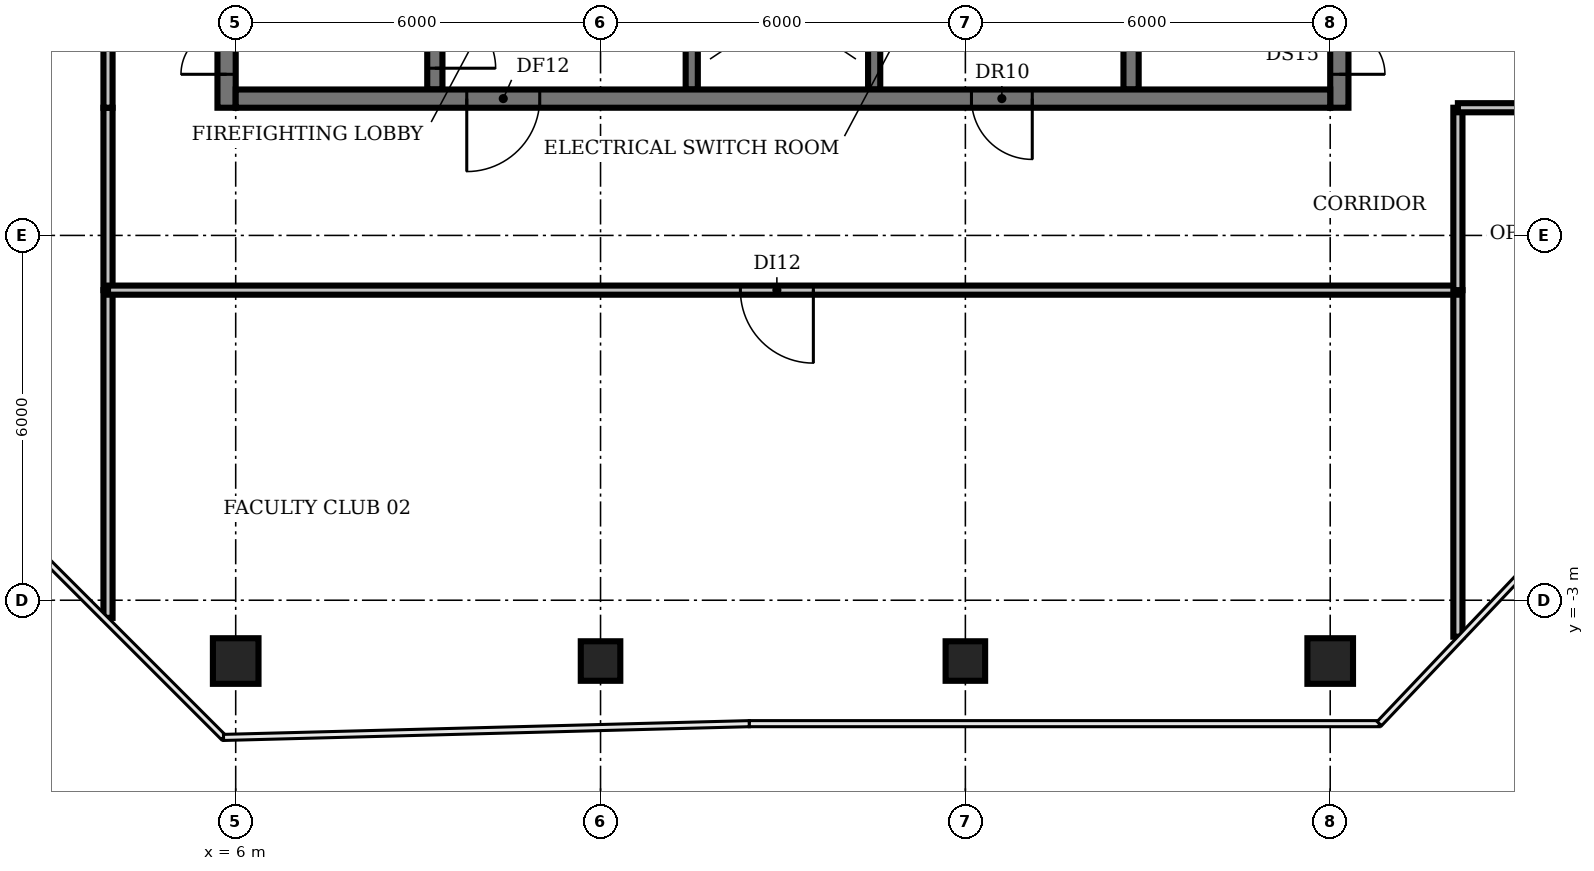
"""IFC4 building model, lengths in metres.
Left out: names, types, materials, properties, quantities, classifications, styles, units other than length and angle.
Written with IfcOpenShell. Run it as: python <this file> out.ifc"""

import sys

from ifc_helpers import new_model, si_unit, direction, frame, frame_2d, origin, origin_2d, place, context, subcontext, project, spatial, rectangle, circle, extrude, element, fill, save


model = new_model("IFC4")
c1 = context("Model", 3, precision=1e-05, world=origin(), true_north=direction((0.0, 1.0)))
c2 = subcontext(c1, "Body", "Model", "MODEL_VIEW")
j1 = project(units=[si_unit("LENGTHUNIT", "METRE"), si_unit("PLANEANGLEUNIT", "RADIAN")], contexts=[c1])
p1 = place(None, origin())
s1 = spatial("IfcSite", under=j1, at=p1, CompositionType="ELEMENT")
p2 = place(p1, origin())
s2 = spatial("IfcBuilding", under=s1, at=p2, CompositionType="ELEMENT")
p3 = place(p2, frame((0.0, 0.0, 327.2)))
s3 = spatial("IfcBuildingStorey", under=s2, at=p3, CompositionType="ELEMENT", Elevation=327.2)
p4 = place(p3, frame((6.0, -4.0, 0.0), z_axis=(0.0, 0.0, 1.0), x_axis=(1.0, 0.0, 0.0)))
e1 = element("IfcColumn", 1, at=p4, inside=s3, PredefinedType="COLUMN", context=c2, shape_type="SweptSolid", body=[
    extrude(circle(Radius=0.375, at=origin_2d()), origin(), (0.0, 0.0, 1.0), 3.9),
])
for number, where, z_axis, x_axis in (
    (2, (12.0, -4.0, 0.0), (0.0, 0.0, 1.0), (1.0, 0.0, 0.0)),
    (3, (18.0, -4.0, 0.0), (0.0, 0.0, 1.0), (1.0, 0.0, 0.0)),
):
    element("IfcColumn", number, at=place(p3, frame(where, z_axis=z_axis, x_axis=x_axis)), inside=s3, PredefinedType="COLUMN", context=c2, shape_type="SweptSolid", body=[
        extrude(rectangle(XDim=0.65, YDim=0.65, at=origin_2d()), origin(), (0.0, 0.0, 1.0), 3.9),
    ])
p5 = place(p3, frame((24.0, -4.0, 0.0), z_axis=(0.0, 0.0, 1.0), x_axis=(1.0, 0.0, 0.0)))
e4 = element("IfcColumn", 4, at=p5, inside=s3, PredefinedType="COLUMN", context=c2, shape_type="SweptSolid", body=[
    extrude(circle(Radius=0.375, at=origin_2d()), origin(), (0.0, 0.0, 1.0), 3.9),
])
p6 = place(p3, frame((9.275, 11.825, 0.0), z_axis=(0.0, 0.0, 1.0), x_axis=(0.0, -1.0, 0.0)))
e5 = element("IfcWall", 5, at=p6, inside=s3, PredefinedType="SHEAR", context=c2, shape_type="SweptSolid", body=[
    extrude(rectangle(XDim=6.425, YDim=0.25, at=frame_2d((3.212, 0.0))), origin(), (0.0, 0.0, 1.0), 3.9),
])
p7 = place(p6, frame((5.075, 0.0, 0.0)))
e6 = element("IfcOpeningElement", 6, at=p7, cuts=e5, PredefinedType="OPENING", context=c2, shape_type="SweptSolid", body=[
    extrude(rectangle(XDim=1.0, YDim=2.1, at=frame_2d((0.5, 1.05))), frame((0.0, 0.135, 0.0), z_axis=(0.0, -1.0, 0.0), x_axis=(1.0, 0.0, 0.0)), (0.0, 0.0, 1.0), 0.27),
])
p8 = place(p3, frame((13.5, 5.4, 0.0), z_axis=(0.0, 0.0, 1.0), x_axis=(0.0, 1.0, 0.0)))
e7 = element("IfcWall", 7, at=p8, inside=s3, PredefinedType="SHEAR", context=c2, shape_type="SweptSolid", body=[
    extrude(rectangle(XDim=8.2, YDim=0.2, at=frame_2d((4.1, 0.0))), origin(), (0.0, 0.0, 1.0), 3.9),
])
p9 = place(p8, frame((0.75, 0.0, 0.0)))
e8 = element("IfcOpeningElement", 8, at=p9, cuts=e7, PredefinedType="OPENING", context=c2, shape_type="SweptSolid", body=[
    extrude(rectangle(XDim=1.1, YDim=2.1, at=frame_2d((0.55, 1.05))), frame((0.0, 0.11, 0.0), z_axis=(0.0, -1.0, 0.0), x_axis=(1.0, 0.0, 0.0)), (0.0, 0.0, 1.0), 0.22),
])
p10 = place(p8, frame((3.55, 0.0, 0.0)))
e9 = element("IfcOpeningElement", 9, at=p10, cuts=e7, PredefinedType="OPENING", context=c2, shape_type="SweptSolid", body=[
    extrude(rectangle(XDim=1.1, YDim=2.1, at=frame_2d((0.55, 1.05))), frame((0.0, 0.11, 0.0), z_axis=(0.0, -1.0, 0.0), x_axis=(1.0, 0.0, 0.0)), (0.0, 0.0, 1.0), 0.22),
])
p11 = place(p8, frame((6.35, 0.0, 0.0)))
e10 = element("IfcOpeningElement", 10, at=p11, cuts=e7, PredefinedType="OPENING", context=c2, shape_type="SweptSolid", body=[
    extrude(rectangle(XDim=1.1, YDim=2.1, at=frame_2d((0.55, 1.05))), frame((0.0, 0.11, 0.0), z_axis=(0.0, -1.0, 0.0), x_axis=(1.0, 0.0, 0.0)), (0.0, 0.0, 1.0), 0.22),
])
p12 = place(p3, frame((16.5, 5.4, 0.0), z_axis=(0.0, 0.0, 1.0), x_axis=(0.0, 1.0, 0.0)))
e11 = element("IfcWall", 11, at=p12, inside=s3, PredefinedType="SHEAR", context=c2, shape_type="SweptSolid", body=[
    extrude(rectangle(XDim=8.2, YDim=0.2, at=frame_2d((4.1, 0.0))), origin(), (0.0, 0.0, 1.0), 3.9),
])
p13 = place(p3, frame((20.725, 5.4, 0.0), z_axis=(0.0, 0.0, 1.0), x_axis=(0.0, 1.0, 0.0)))
e12 = element("IfcWall", 12, at=p13, inside=s3, PredefinedType="SHEAR", context=c2, shape_type="SweptSolid", body=[
    extrude(rectangle(XDim=6.3, YDim=0.25, at=frame_2d((3.15, 0.0))), origin(), (0.0, 0.0, 1.0), 3.9),
])
p14 = place(p3, frame((5.85, 5.1, 0.0), z_axis=(0.0, 0.0, 1.0), x_axis=(0.0, 1.0, 0.0)))
e13 = element("IfcWall", 13, at=p14, inside=s3, PredefinedType="SHEAR", context=c2, shape_type="SweptSolid", body=[
    extrude(rectangle(XDim=20.0, YDim=0.3, at=frame_2d((10.0, 0.0))), origin(), (0.0, 0.0, 1.0), 3.9),
])
p15 = place(p14, frame((0.55, 0.0, 0.0)))
e14 = element("IfcOpeningElement", 14, at=p15, cuts=e13, PredefinedType="OPENING", context=c2, shape_type="SweptSolid", body=[
    extrude(rectangle(XDim=1.5, YDim=2.1, at=frame_2d((0.75, 1.05))), frame((0.0, 0.16, 0.0), z_axis=(0.0, -1.0, 0.0), x_axis=(1.0, 0.0, 0.0)), (0.0, 0.0, 1.0), 0.32),
])
p16 = place(p14, frame((7.0, 0.0, 0.0)))
e15 = element("IfcOpeningElement", 15, at=p16, cuts=e13, PredefinedType="OPENING", context=c2, shape_type="SweptSolid", body=[
    extrude(rectangle(XDim=1.2, YDim=2.1, at=frame_2d((0.6, 1.05))), frame((0.0, 0.16, 0.0), z_axis=(0.0, -1.0, 0.0), x_axis=(1.0, 0.0, 0.0)), (0.0, 0.0, 1.0), 0.32),
])
p17 = place(p14, frame((13.55, 0.0, 0.0)))
e16 = element("IfcOpeningElement", 16, at=p17, cuts=e13, PredefinedType="OPENING", context=c2, shape_type="SweptSolid", body=[
    extrude(rectangle(XDim=1.2, YDim=2.1, at=frame_2d((0.6, 1.05))), frame((0.0, 0.16, 0.0), z_axis=(0.0, -1.0, 0.0), x_axis=(1.0, 0.0, 0.0)), (0.0, 0.0, 1.0), 0.32),
])
p18 = place(p3, frame((24.15, 25.705, 0.0), z_axis=(0.0, 0.0, 1.0), x_axis=(0.0, -1.0, 0.0)))
e17 = element("IfcWall", 17, at=p18, inside=s3, PredefinedType="SHEAR", context=c2, shape_type="SweptSolid", body=[
    extrude(rectangle(XDim=20.605, YDim=0.3, at=frame_2d((10.302, 0.0))), origin(), (0.0, 0.0, 1.0), 3.9),
])
p19 = place(p18, frame((18.555, 0.0, 0.0)))
e18 = element("IfcOpeningElement", 18, at=p19, cuts=e17, PredefinedType="OPENING", context=c2, shape_type="SweptSolid", body=[
    extrude(rectangle(XDim=1.5, YDim=2.1, at=frame_2d((0.75, 1.05))), frame((0.0, 0.16, 0.0), z_axis=(0.0, -1.0, 0.0), x_axis=(1.0, 0.0, 0.0)), (0.0, 0.0, 1.0), 0.32),
])
p20 = place(p18, frame((12.455, 0.0, 0.0)))
e19 = element("IfcOpeningElement", 19, at=p20, cuts=e17, PredefinedType="OPENING", context=c2, shape_type="SweptSolid", body=[
    extrude(rectangle(XDim=0.9, YDim=2.1, at=frame_2d((0.45, 1.05))), frame((0.0, 0.16, 0.0), z_axis=(0.0, -1.0, 0.0), x_axis=(1.0, 0.0, 0.0)), (0.0, 0.0, 1.0), 0.32),
])
p21 = place(p18, frame((6.455, 0.0, 0.0)))
e20 = element("IfcOpeningElement", 20, at=p21, cuts=e17, PredefinedType="OPENING", context=c2, shape_type="SweptSolid", body=[
    extrude(rectangle(XDim=2.0, YDim=2.1, at=frame_2d((1.0, 1.05))), frame((0.0, 0.16, 0.0), z_axis=(0.0, -1.0, 0.0), x_axis=(1.0, 0.0, 0.0)), (0.0, 0.0, 1.0), 0.32),
])
p22 = place(p3, frame((24.0, 5.25, 0.0), z_axis=(0.0, 0.0, 1.0), x_axis=(-1.0, 0.0, 0.0)))
e21 = element("IfcWall", 21, at=p22, inside=s3, PredefinedType="SHEAR", context=c2, shape_type="SweptSolid", body=[
    extrude(rectangle(XDim=18.0, YDim=0.3, at=frame_2d((9.0, 0.0))), origin(), (0.0, 0.0, 1.0), 3.9),
])
p23 = place(p22, frame((13.0, 0.0, 0.0)))
e22 = element("IfcOpeningElement", 22, at=p23, cuts=e21, PredefinedType="OPENING", context=c2, shape_type="SweptSolid", body=[
    extrude(rectangle(XDim=1.2, YDim=2.1, at=frame_2d((0.6, 1.05))), frame((0.0, 0.16, 0.0), z_axis=(0.0, -1.0, 0.0), x_axis=(1.0, 0.0, 0.0)), (0.0, 0.0, 1.0), 0.32),
])
p24 = place(p22, frame((4.9, 0.0, 0.0)))
e23 = element("IfcOpeningElement", 23, at=p24, cuts=e21, PredefinedType="OPENING", context=c2, shape_type="SweptSolid", body=[
    extrude(rectangle(XDim=1.0, YDim=2.1, at=frame_2d((0.5, 1.05))), frame((0.0, 0.16, 0.0), z_axis=(0.0, -1.0, 0.0), x_axis=(1.0, 0.0, 0.0)), (0.0, 0.0, 1.0), 0.32),
])
p25 = place(p3, frame((3.9, -3.29, 0.0), z_axis=(0.0, 0.0, 1.0), x_axis=(0.0, 1.0, 0.0)))
e24 = element("IfcWall", 24, at=p25, inside=s3, PredefinedType="PARTITIONING", context=c2, shape_type="SweptSolid", body=[
    extrude(rectangle(XDim=5.39, YDim=0.15, at=frame_2d((2.695, 0.0))), origin(), (0.0, 0.0, 1.0), 2.95),
])
p26 = place(p3, frame((3.9, 2.1, 0.0), z_axis=(0.0, 0.0, 1.0), x_axis=(0.0, 1.0, 0.0)))
e25 = element("IfcWall", 25, at=p26, inside=s3, PredefinedType="PARTITIONING", context=c2, shape_type="SweptSolid", body=[
    extrude(rectangle(XDim=3.0, YDim=0.15, at=frame_2d((1.5, 0.0))), origin(), (0.0, 0.0, 1.0), 2.95),
])
p27 = place(p3, frame((3.9, 5.1, 0.0), z_axis=(0.0, 0.0, 1.0), x_axis=(0.0, 1.0, 0.0)))
e26 = element("IfcWall", 26, at=p27, inside=s3, PredefinedType="PARTITIONING", context=c2, shape_type="SweptSolid", body=[
    extrude(rectangle(XDim=13.9, YDim=0.15, at=frame_2d((6.95, 0.0))), origin(), (0.0, 0.0, 1.0), 2.95),
])
p28 = place(p27, frame((6.2, 0.0, 0.0)))
e27 = element("IfcOpeningElement", 27, at=p28, cuts=e26, PredefinedType="OPENING", context=c2, shape_type="SweptSolid", body=[
    extrude(rectangle(XDim=1.2, YDim=2.1, at=frame_2d((0.6, 1.05))), frame((0.0, 0.085, 0.0), z_axis=(0.0, -1.0, 0.0), x_axis=(1.0, 0.0, 0.0)), (0.0, 0.0, 1.0), 0.17),
])
p29 = place(p3, frame((26.1, -3.6, 0.0), z_axis=(0.0, 0.0, 1.0), x_axis=(0.0, 1.0, 0.0)))
e28 = element("IfcWall", 28, at=p29, inside=s3, PredefinedType="PARTITIONING", context=c2, shape_type="SweptSolid", body=[
    extrude(rectangle(XDim=5.7, YDim=0.15, at=frame_2d((2.85, 0.0))), origin(), (0.0, 0.0, 1.0), 2.95),
])
p30 = place(p3, frame((26.1, 2.1, 0.0), z_axis=(0.0, 0.0, 1.0), x_axis=(-1.0, 0.0, 0.0)))
e29 = element("IfcWall", 29, at=p30, inside=s3, PredefinedType="PARTITIONING", context=c2, shape_type="SweptSolid", body=[
    extrude(rectangle(XDim=22.2, YDim=0.15, at=frame_2d((11.1, 0.0))), origin(), (0.0, 0.0, 1.0), 2.95),
])
p31 = place(p30, frame((10.6, 0.0, 0.0)))
e30 = element("IfcOpeningElement", 30, at=p31, cuts=e29, PredefinedType="OPENING", context=c2, shape_type="SweptSolid", body=[
    extrude(rectangle(XDim=1.2, YDim=2.1, at=frame_2d((0.6, 1.05))), frame((0.0, 0.085, 0.0), z_axis=(0.0, -1.0, 0.0), x_axis=(1.0, 0.0, 0.0)), (0.0, 0.0, 1.0), 0.17),
])
p32 = place(p3, frame((26.1, 2.1, 0.0), z_axis=(0.0, 0.0, 1.0), x_axis=(0.0, 1.0, 0.0)))
e31 = element("IfcWall", 31, at=p32, inside=s3, PredefinedType="PARTITIONING", context=c2, shape_type="SweptSolid", body=[
    extrude(rectangle(XDim=3.0, YDim=0.15, at=frame_2d((1.5, 0.0))), origin(), (0.0, 0.0, 1.0), 2.95),
])
p33 = place(p3, frame((31.37, 5.1, 0.0), z_axis=(0.0, 0.0, 1.0), x_axis=(-1.0, 0.0, 0.0)))
e32 = element("IfcWall", 32, at=p33, inside=s3, PredefinedType="PARTITIONING", context=c2, shape_type="SweptSolid", body=[
    extrude(rectangle(XDim=5.27, YDim=0.15, at=frame_2d((2.635, 0.0))), origin(), (0.0, 0.0, 1.0), 2.95),
])
p34 = place(p33, frame((2.07, 0.0, 0.0)))
e33 = element("IfcOpeningElement", 33, at=p34, cuts=e32, PredefinedType="OPENING", context=c2, shape_type="SweptSolid", body=[
    extrude(rectangle(XDim=1.2, YDim=2.1, at=frame_2d((0.6, 1.05))), frame((0.0, 0.085, 0.0), z_axis=(0.0, -1.0, 0.0), x_axis=(1.0, 0.0, 0.0)), (0.0, 0.0, 1.0), 0.17),
])
p35 = place(p7, origin())
e34 = element("IfcDoor", 34, at=p35, inside=s3, OperationType="SINGLE_SWING_RIGHT", PredefinedType="DOOR", context=c2, shape_type="SweptSolid", body=[
    extrude(rectangle(XDim=1.0, YDim=2.1, at=frame_2d((0.5, 1.05))), frame((0.0, 0.025, 0.0), z_axis=(0.0, -1.0, 0.0), x_axis=(1.0, 0.0, 0.0)), (0.0, 0.0, 1.0), 0.05),
])
fill(e6, e34)
p36 = place(p15, origin())
e35 = element("IfcDoor", 35, at=p36, inside=s3, OperationType="DOUBLE_DOOR_SINGLE_SWING", PredefinedType="DOOR", context=c2, shape_type="SweptSolid", body=[
    extrude(rectangle(XDim=1.5, YDim=2.1, at=frame_2d((0.75, 1.05))), frame((0.0, 0.025, 0.0), z_axis=(0.0, -1.0, 0.0), x_axis=(1.0, 0.0, 0.0)), (0.0, 0.0, 1.0), 0.05),
])
fill(e14, e35)
p37 = place(p19, origin())
e36 = element("IfcDoor", 36, at=p37, inside=s3, OperationType="DOUBLE_DOOR_SINGLE_SWING", PredefinedType="DOOR", context=c2, shape_type="SweptSolid", body=[
    extrude(rectangle(XDim=1.5, YDim=2.1, at=frame_2d((0.75, 1.05))), frame((0.0, 0.025, 0.0), z_axis=(0.0, -1.0, 0.0), x_axis=(1.0, 0.0, 0.0)), (0.0, 0.0, 1.0), 0.05),
])
fill(e18, e36)
p38 = place(p23, origin())
e37 = element("IfcDoor", 37, at=p38, inside=s3, OperationType="SINGLE_SWING_RIGHT", PredefinedType="DOOR", context=c2, shape_type="SweptSolid", body=[
    extrude(rectangle(XDim=1.2, YDim=2.1, at=frame_2d((0.6, 1.05))), frame((0.0, 0.025, 0.0), z_axis=(0.0, -1.0, 0.0), x_axis=(1.0, 0.0, 0.0)), (0.0, 0.0, 1.0), 0.05),
])
fill(e22, e37)
p39 = place(p24, origin())
e38 = element("IfcDoor", 38, at=p39, inside=s3, OperationType="SINGLE_SWING_LEFT", PredefinedType="DOOR", context=c2, shape_type="SweptSolid", body=[
    extrude(rectangle(XDim=1.0, YDim=2.1, at=frame_2d((0.5, 1.05))), frame((0.0, 0.025, 0.0), z_axis=(0.0, -1.0, 0.0), x_axis=(1.0, 0.0, 0.0)), (0.0, 0.0, 1.0), 0.05),
])
fill(e23, e38)
p40 = place(p31, origin())
e39 = element("IfcDoor", 39, at=p40, inside=s3, OperationType="SINGLE_SWING_LEFT", PredefinedType="DOOR", context=c2, shape_type="SweptSolid", body=[
    extrude(rectangle(XDim=1.2, YDim=2.1, at=frame_2d((0.6, 1.05))), frame((0.0, 0.025, 0.0), z_axis=(0.0, -1.0, 0.0), x_axis=(1.0, 0.0, 0.0)), (0.0, 0.0, 1.0), 0.05),
])
fill(e30, e39)
save(model, sys.argv[1])
